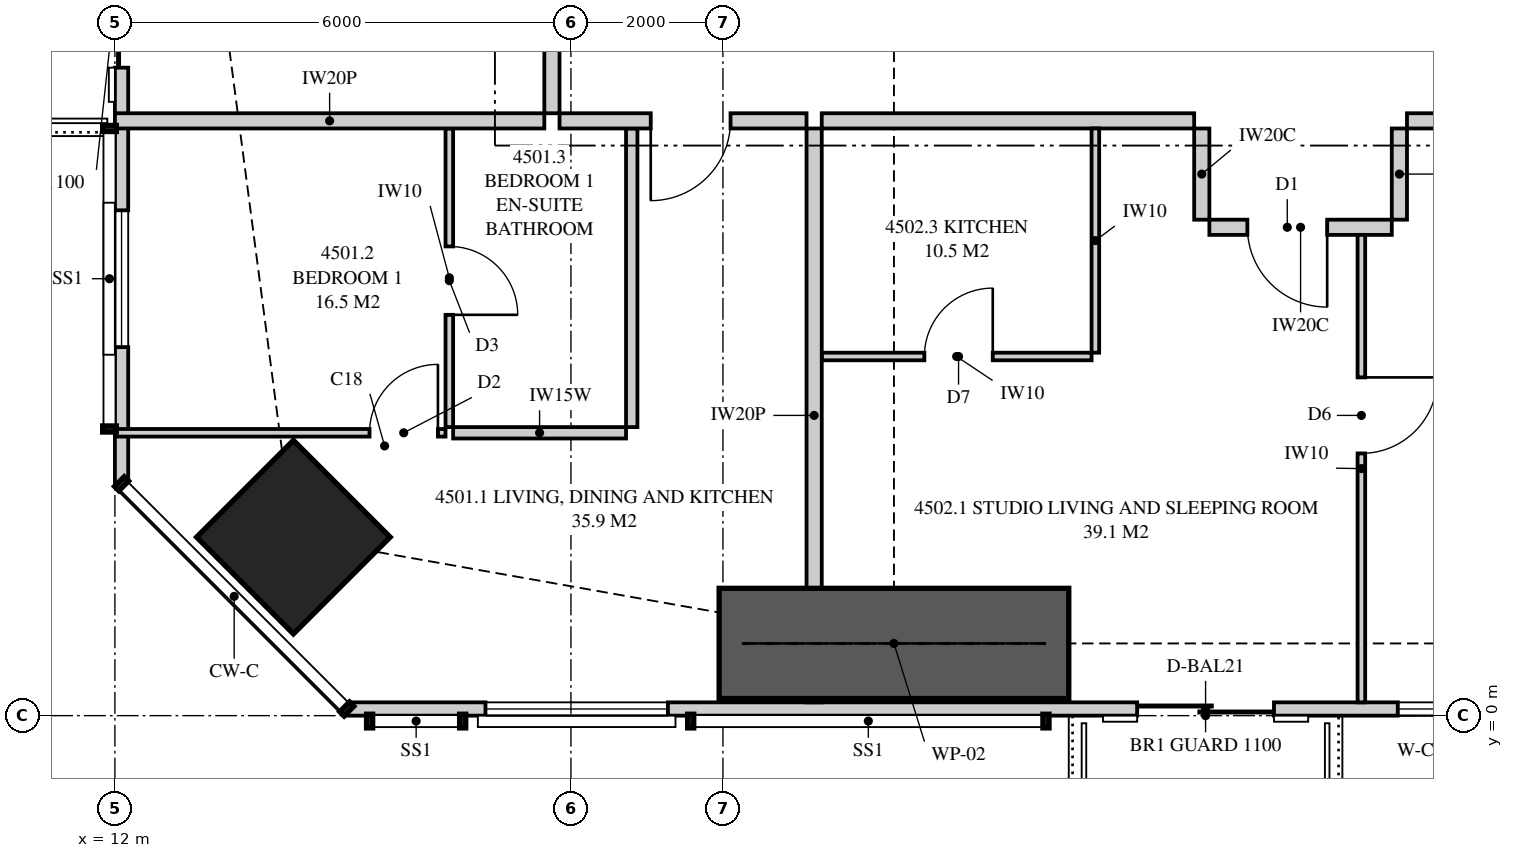
"""IFC4 building model, lengths in metres.
Left out: names, types, materials, properties, quantities, classifications, styles, units other than length and angle.
Written with IfcOpenShell. Run it as: python <this file> out.ifc"""

import sys

from ifc_helpers import new_model, si_unit, direction, frame, frame_2d, origin, origin_2d, place, context, subcontext, project, spatial, polyline, rectangle, outline, extrude, element, fill, save


model = new_model("IFC4")
c1 = context("Model", 3, precision=1e-05, world=origin(), true_north=direction((0.0, 1.0)))
c2 = subcontext(c1, "Body", "Model", "MODEL_VIEW")
j1 = project(units=[si_unit("LENGTHUNIT", "METRE"), si_unit("PLANEANGLEUNIT", "RADIAN")], contexts=[c1])
p1 = place(None, origin())
s1 = spatial("IfcSite", under=j1, at=p1, CompositionType="ELEMENT")
p2 = place(p1, origin())
s2 = spatial("IfcBuilding", under=s1, at=p2, CompositionType="ELEMENT")
p3 = place(p2, frame((0.0, 0.0, 167.75)))
s3 = spatial("IfcBuildingStorey", under=s2, at=p3, CompositionType="ELEMENT", Elevation=167.75)
p4 = place(p3, frame((14.348, 2.348, 0.0), z_axis=(0.0, 0.0, 1.0), x_axis=(0.707106781187, 0.707106781187, 0.0)))
e1 = element("IfcColumn", 1, at=p4, inside=s3, PredefinedType="COLUMN", context=c2, shape_type="SweptSolid", body=[
    extrude(rectangle(XDim=1.8, YDim=1.8, at=origin_2d()), origin(), (0.0, 0.0, 1.0), 3.35),
])
p5 = place(p3, frame((15.051, 0.087, 0.0), z_axis=(0.0, 0.0, 1.0), x_axis=(1.0, 0.0, 0.0)))
e2 = element("IfcWall", 2, at=p5, inside=s3, PredefinedType="SOLIDWALL", context=c2, shape_type="SweptSolid", body=[
    extrude(outline(polyline([(0.0, 0.0), (34.897, 0.0), (34.897, 3.11), (27.91, 3.11), (27.91, 2.15), (27.836, 2.15), (27.836, 3.11), (27.699, 3.11), (27.699, 2.15), (7.199, 2.15), (7.199, 3.11), (7.062, 3.11), (7.062, 2.15), (6.987, 2.15), (6.987, 3.11), (0.0, 3.11), (0.0, 0.0)])), frame((0.0, 0.087, 0.0), z_axis=(0.0, -1.0, 0.0), x_axis=(1.0, 0.0, 0.0)), (0.0, 0.0, 1.0), 0.175),
])
p6 = place(p5, frame((1.824, 0.0, 0.4)))
e3 = element("IfcOpeningElement", 3, at=p6, cuts=e2, PredefinedType="OPENING", context=c2, shape_type="SweptSolid", body=[
    extrude(rectangle(XDim=2.4, YDim=1.7, at=frame_2d((1.2, 0.85))), frame((0.0, 0.097, 0.0), z_axis=(0.0, -1.0, 0.0), x_axis=(1.0, 0.0, 0.0)), (0.0, 0.0, 1.0), 0.195),
])
p7 = place(p5, frame((10.399, 0.0, 0.0)))
e4 = element("IfcOpeningElement", 4, at=p7, cuts=e2, PredefinedType="OPENING", context=c2, shape_type="SweptSolid", body=[
    extrude(rectangle(XDim=1.8, YDim=2.1, at=frame_2d((0.9, 1.05))), frame((0.0, 0.097, 0.0), z_axis=(0.0, -1.0, 0.0), x_axis=(1.0, 0.0, 0.0)), (0.0, 0.0, 1.0), 0.195),
])
p8 = place(p5, frame((13.827, 0.0, 0.4)))
e5 = element("IfcOpeningElement", 5, at=p8, cuts=e2, PredefinedType="OPENING", context=c2, shape_type="SweptSolid", body=[
    extrude(rectangle(XDim=1.2, YDim=1.7, at=frame_2d((0.6, 0.85))), frame((0.0, 0.097, 0.0), z_axis=(0.0, -1.0, 0.0), x_axis=(1.0, 0.0, 0.0)), (0.0, 0.0, 1.0), 0.195),
])
p9 = place(p5, frame((22.799, 0.0, 0.0)))
e6 = element("IfcOpeningElement", 6, at=p9, cuts=e2, PredefinedType="OPENING", context=c2, shape_type="SweptSolid", body=[
    extrude(rectangle(XDim=1.8, YDim=2.1, at=frame_2d((0.9, 1.05))), frame((0.0, 0.097, 0.0), z_axis=(0.0, -1.0, 0.0), x_axis=(1.0, 0.0, 0.0)), (0.0, 0.0, 1.0), 0.195),
])
p10 = place(p5, frame((19.849, 0.0, 0.4)))
e7 = element("IfcOpeningElement", 7, at=p10, cuts=e2, PredefinedType="OPENING", context=c2, shape_type="SweptSolid", body=[
    extrude(rectangle(XDim=2.4, YDim=1.7, at=frame_2d((1.2, 0.85))), frame((0.0, 0.097, 0.0), z_axis=(0.0, -1.0, 0.0), x_axis=(1.0, 0.0, 0.0)), (0.0, 0.0, 1.0), 0.195),
])
p11 = place(p5, frame((30.108, 0.0, 0.4)))
e8 = element("IfcOpeningElement", 8, at=p11, cuts=e2, PredefinedType="OPENING", context=c2, shape_type="SweptSolid", body=[
    extrude(rectangle(XDim=2.4, YDim=1.7, at=frame_2d((1.2, 0.85))), frame((0.0, 0.097, 0.0), z_axis=(0.0, -1.0, 0.0), x_axis=(1.0, 0.0, 0.0)), (0.0, 0.0, 1.0), 0.195),
])
p12 = place(p3, frame((12.087, 32.949, 0.0), z_axis=(0.0, 0.0, 1.0), x_axis=(0.0, -1.0, 0.0)))
e9 = element("IfcWall", 9, at=p12, inside=s3, PredefinedType="SOLIDWALL", context=c2, shape_type="SweptSolid", body=[
    extrude(outline(polyline([(0.0, 0.0), (29.897, 0.0), (29.897, 3.11), (20.191, 3.11), (20.191, 2.15), (20.051, 2.15), (20.051, 3.11), (19.949, 3.11), (19.949, 2.15), (7.949, 2.15), (7.949, 3.11), (7.823, 3.11), (7.823, 2.15), (7.73, 2.15), (7.73, 3.11), (0.0, 3.11), (0.0, 0.0)])), frame((0.0, 0.087, 0.0), z_axis=(0.0, -1.0, 0.0), x_axis=(1.0, 0.0, 0.0)), (0.0, 0.0, 1.0), 0.175),
])
p13 = place(p12, frame((1.297, 0.0, 0.4)))
e10 = element("IfcOpeningElement", 10, at=p13, cuts=e9, PredefinedType="OPENING", context=c2, shape_type="SweptSolid", body=[
    extrude(rectangle(XDim=1.8, YDim=1.7, at=frame_2d((0.9, 0.85))), frame((0.0, 0.097, 0.0), z_axis=(0.0, -1.0, 0.0), x_axis=(1.0, 0.0, 0.0)), (0.0, 0.0, 1.0), 0.195),
])
p14 = place(p12, frame((4.349, 0.0, 0.4)))
e11 = element("IfcOpeningElement", 11, at=p14, cuts=e9, PredefinedType="OPENING", context=c2, shape_type="SweptSolid", body=[
    extrude(rectangle(XDim=1.2, YDim=1.7, at=frame_2d((0.6, 0.85))), frame((0.0, 0.097, 0.0), z_axis=(0.0, -1.0, 0.0), x_axis=(1.0, 0.0, 0.0)), (0.0, 0.0, 1.0), 0.195),
])
p15 = place(p12, frame((11.024, 0.0, 0.4)))
e12 = element("IfcOpeningElement", 12, at=p15, cuts=e9, PredefinedType="OPENING", context=c2, shape_type="SweptSolid", body=[
    extrude(rectangle(XDim=1.8, YDim=1.7, at=frame_2d((0.9, 0.85))), frame((0.0, 0.097, 0.0), z_axis=(0.0, -1.0, 0.0), x_axis=(1.0, 0.0, 0.0)), (0.0, 0.0, 1.0), 0.195),
])
p16 = place(p12, frame((15.044, 0.0, 0.4)))
e13 = element("IfcOpeningElement", 13, at=p16, cuts=e9, PredefinedType="OPENING", context=c2, shape_type="SweptSolid", body=[
    extrude(rectangle(XDim=2.4, YDim=1.7, at=frame_2d((1.2, 0.85))), frame((0.0, 0.097, 0.0), z_axis=(0.0, -1.0, 0.0), x_axis=(1.0, 0.0, 0.0)), (0.0, 0.0, 1.0), 0.195),
])
p17 = place(p12, frame((22.624, 0.0, 0.0)))
e14 = element("IfcOpeningElement", 14, at=p17, cuts=e9, PredefinedType="OPENING", context=c2, shape_type="SweptSolid", body=[
    extrude(rectangle(XDim=1.8, YDim=2.1, at=frame_2d((0.9, 1.05))), frame((0.0, 0.097, 0.0), z_axis=(0.0, -1.0, 0.0), x_axis=(1.0, 0.0, 0.0)), (0.0, 0.0, 1.0), 0.195),
])
p18 = place(p12, frame((26.301, 0.0, 0.4)))
e15 = element("IfcOpeningElement", 15, at=p18, cuts=e9, PredefinedType="OPENING", context=c2, shape_type="SweptSolid", body=[
    extrude(rectangle(XDim=1.8, YDim=1.7, at=frame_2d((0.9, 0.85))), frame((0.0, 0.097, 0.0), z_axis=(0.0, -1.0, 0.0), x_axis=(1.0, 0.0, 0.0)), (0.0, 0.0, 1.0), 0.195),
])
p19 = place(p3, frame((21.2, 0.175, 0.0), z_axis=(0.0, 0.0, 1.0), x_axis=(0.0, 1.0, 0.0)))
e16 = element("IfcWall", 16, at=p19, inside=s3, PredefinedType="PARTITIONING", context=c2, shape_type="SweptSolid", body=[
    extrude(outline(polyline([(0.037, 3.11), (0.0, 3.11), (0.0, 0.0), (0.529, 0.0), (0.529, 0.667), (1.021, 0.667), (1.021, 0.0), (7.55, 0.0), (7.55, 3.11), (1.885, 3.11), (1.885, 2.15), (1.021, 2.15), (1.021, 1.483), (0.529, 1.483), (0.529, 2.15), (0.037, 2.15), (0.037, 3.11)])), frame((0.0, 0.1, 0.0), z_axis=(0.0, -1.0, 0.0), x_axis=(1.0, 0.0, 0.0)), (0.0, 0.0, 1.0), 0.2),
])
p20 = place(p3, frame((17.85, 7.825, 0.0), z_axis=(0.0, 0.0, 1.0), x_axis=(1.0, 0.0, 0.0)))
e17 = element("IfcWall", 17, at=p20, inside=s3, PredefinedType="PARTITIONING", context=c2, shape_type="SweptSolid", body=[
    extrude(rectangle(XDim=3.25, YDim=0.2, at=frame_2d((1.625, 0.0))), origin(), (0.0, 0.0, 1.0), 3.11),
])
p21 = place(p20, frame((1.2, 0.0, 0.0)))
e18 = element("IfcOpeningElement", 18, at=p21, cuts=e17, PredefinedType="OPENING", context=c2, shape_type="SweptSolid", body=[
    extrude(rectangle(XDim=1.05, YDim=2.2, at=frame_2d((0.525, 1.1))), frame((0.0, 0.11, 0.0), z_axis=(0.0, -1.0, 0.0), x_axis=(1.0, 0.0, 0.0)), (0.0, 0.0, 1.0), 0.22),
])
p22 = place(p3, frame((16.4, 3.796, 0.0), z_axis=(0.0, 0.0, 1.0), x_axis=(0.0, 1.0, 0.0)))
e19 = element("IfcWall", 19, at=p22, inside=s3, PredefinedType="PARTITIONING", context=c2, shape_type="SweptSolid", body=[
    extrude(rectangle(XDim=3.929, YDim=0.1, at=frame_2d((1.964, 0.0))), origin(), (0.0, 0.0, 1.0), 3.11),
])
p23 = place(p22, frame((1.477, 0.0, 0.0)))
e20 = element("IfcOpeningElement", 20, at=p23, cuts=e19, PredefinedType="OPENING", context=c2, shape_type="SweptSolid", body=[
    extrude(rectangle(XDim=0.9, YDim=2.1, at=frame_2d((0.45, 1.05))), frame((0.0, 0.06, 0.0), z_axis=(0.0, -1.0, 0.0), x_axis=(1.0, 0.0, 0.0)), (0.0, 0.0, 1.0), 0.12),
])
p24 = place(p3, frame((16.35, 3.721, 0.0), z_axis=(0.0, 0.0, 1.0), x_axis=(-1.0, 0.0, 0.0)))
e21 = element("IfcWall", 21, at=p24, inside=s3, PredefinedType="PARTITIONING", context=c2, shape_type="SweptSolid", body=[
    extrude(outline(polyline([(0.0, 0.0), (4.35, 0.0), (4.35, 3.11), (3.049, 3.11), (3.049, 2.15), (1.314, 2.15), (1.314, 3.11), (0.0, 3.11), (0.0, 0.0)])), frame((0.0, 0.05, 0.0), z_axis=(0.0, -1.0, 0.0), x_axis=(1.0, 0.0, 0.0)), (0.0, 0.0, 1.0), 0.1),
])
p25 = place(p24, frame((0.1, 0.0, 0.0)))
e22 = element("IfcOpeningElement", 22, at=p25, cuts=e21, PredefinedType="OPENING", context=c2, shape_type="SweptSolid", body=[
    extrude(rectangle(XDim=0.9, YDim=2.1, at=frame_2d((0.45, 1.05))), frame((0.0, 0.06, 0.0), z_axis=(0.0, -1.0, 0.0), x_axis=(1.0, 0.0, 0.0)), (0.0, 0.0, 1.0), 0.12),
])
p26 = place(p3, frame((18.725, 3.721, 0.0), z_axis=(0.0, 0.0, 1.0), x_axis=(-1.0, 0.0, 0.0)))
e23 = element("IfcWall", 23, at=p26, inside=s3, PredefinedType="PLUMBINGWALL", context=c2, shape_type="SweptSolid", body=[
    extrude(rectangle(XDim=2.275, YDim=0.15, at=frame_2d((1.138, 0.0))), origin(), (0.0, 0.0, 1.0), 3.11),
])
p27 = place(p3, frame((18.8, 3.796, 0.0), z_axis=(0.0, 0.0, 1.0), x_axis=(0.0, 1.0, 0.0)))
e24 = element("IfcWall", 24, at=p27, inside=s3, PredefinedType="PLUMBINGWALL", context=c2, shape_type="SweptSolid", body=[
    extrude(rectangle(XDim=3.929, YDim=0.15, at=frame_2d((1.964, 0.0))), origin(), (0.0, 0.0, 1.0), 3.11),
])
p28 = place(p3, frame((21.3, 7.825, 0.0), z_axis=(0.0, 0.0, 1.0), x_axis=(1.0, 0.0, 0.0)))
e25 = element("IfcWall", 25, at=p28, inside=s3, PredefinedType="PARTITIONING", context=c2, shape_type="SweptSolid", body=[
    extrude(outline(polyline([(0.0, 0.0), (4.9, 0.0), (4.9, 3.11), (1.287, 3.11), (1.287, 2.541), (0.613, 2.541), (0.613, 3.11), (0.0, 3.11), (0.0, 0.0)])), frame((0.0, 0.1, 0.0), z_axis=(0.0, -1.0, 0.0), x_axis=(1.0, 0.0, 0.0)), (0.0, 0.0, 1.0), 0.2),
])
p29 = place(p3, frame((21.3, 4.725, 0.0), z_axis=(0.0, 0.0, 1.0), x_axis=(1.0, 0.0, 0.0)))
e26 = element("IfcWall", 26, at=p29, inside=s3, PredefinedType="PARTITIONING", context=c2, shape_type="SweptSolid", body=[
    extrude(outline(polyline([(0.0, 0.0), (3.55, 0.0), (3.55, 3.11), (1.237, 3.11), (1.237, 2.541), (0.663, 2.541), (0.663, 3.11), (0.0, 3.11), (0.0, 0.0)])), frame((0.0, 0.05, 0.0), z_axis=(0.0, -1.0, 0.0), x_axis=(1.0, 0.0, 0.0)), (0.0, 0.0, 1.0), 0.1),
])
p30 = place(p29, frame((1.35, 0.0, 0.0)))
e27 = element("IfcOpeningElement", 27, at=p30, cuts=e26, PredefinedType="OPENING", context=c2, shape_type="SweptSolid", body=[
    extrude(rectangle(XDim=0.9, YDim=2.1, at=frame_2d((0.45, 1.05))), frame((0.0, 0.06, 0.0), z_axis=(0.0, -1.0, 0.0), x_axis=(1.0, 0.0, 0.0)), (0.0, 0.0, 1.0), 0.12),
])
p31 = place(p3, frame((24.9, 4.775, 0.0), z_axis=(0.0, 0.0, 1.0), x_axis=(0.0, 1.0, 0.0)))
e28 = element("IfcWall", 28, at=p31, inside=s3, PredefinedType="PARTITIONING", context=c2, shape_type="SweptSolid", body=[
    extrude(rectangle(XDim=2.95, YDim=0.1, at=frame_2d((1.475, 0.0))), origin(), (0.0, 0.0, 1.0), 3.11),
])
p32 = place(p3, frame((28.4, 0.175, 0.0), z_axis=(0.0, 0.0, 1.0), x_axis=(0.0, 1.0, 0.0)))
e29 = element("IfcWall", 29, at=p32, inside=s3, PredefinedType="PARTITIONING", context=c2, shape_type="SweptSolid", body=[
    extrude(outline(polyline([(0.0, 0.0), (6.15, 0.0), (6.15, 3.11), (1.635, 3.11), (1.635, 2.15), (0.0, 2.15), (0.0, 3.11), (0.0, 0.0)])), frame((0.0, 0.05, 0.0), z_axis=(0.0, -1.0, 0.0), x_axis=(1.0, 0.0, 0.0)), (0.0, 0.0, 1.0), 0.1),
])
p33 = place(p32, frame((3.275, 0.0, 0.0)))
e30 = element("IfcOpeningElement", 30, at=p33, cuts=e29, PredefinedType="OPENING", context=c2, shape_type="SweptSolid", body=[
    extrude(rectangle(XDim=1.0, YDim=2.1, at=frame_2d((0.5, 1.05))), frame((0.0, 0.06, 0.0), z_axis=(0.0, -1.0, 0.0), x_axis=(1.0, 0.0, 0.0)), (0.0, 0.0, 1.0), 0.12),
])
p34 = place(p3, frame((12.0, 7.825, 0.0), z_axis=(0.0, 0.0, 1.0), x_axis=(1.0, 0.0, 0.0)))
e31 = element("IfcWall", 31, at=p34, inside=s3, PredefinedType="PARTITIONING", context=c2, shape_type="SweptSolid", body=[
    extrude(outline(polyline([(0.0, 0.0), (5.65, 0.0), (5.65, 3.11), (2.547, 3.11), (2.547, 2.15), (0.712, 2.15), (0.712, 3.11), (0.0, 3.11), (0.0, 0.0)])), frame((0.0, 0.1, 0.0), z_axis=(0.0, -1.0, 0.0), x_axis=(1.0, 0.0, 0.0)), (0.0, 0.0, 1.0), 0.2),
])
p35 = place(p3, frame((17.75, 7.925, 0.0), z_axis=(0.0, 0.0, 1.0), x_axis=(0.0, 1.0, 0.0)))
e32 = element("IfcWall", 32, at=p35, inside=s3, PredefinedType="PARTITIONING", context=c2, shape_type="SweptSolid", body=[
    extrude(outline(polyline([(0.0, 0.0), (14.875, 0.0), (14.875, 3.11), (5.412, 3.11), (5.412, 2.541), (4.738, 2.541), (4.738, 3.11), (0.0, 3.11), (0.0, 0.0)])), frame((0.0, 0.1, 0.0), z_axis=(0.0, -1.0, 0.0), x_axis=(1.0, 0.0, 0.0)), (0.0, 0.0, 1.0), 0.2),
])
p36 = place(p35, frame((6.938, 0.0, 0.0)))
e33 = element("IfcOpeningElement", 33, at=p36, cuts=e32, PredefinedType="OPENING", context=c2, shape_type="SweptSolid", body=[
    extrude(rectangle(XDim=1.05, YDim=2.2, at=frame_2d((0.525, 1.1))), frame((0.0, 0.11, 0.0), z_axis=(0.0, -1.0, 0.0), x_axis=(1.0, 0.0, 0.0)), (0.0, 0.0, 1.0), 0.22),
])
p37 = place(p3, frame((29.0, 7.825, 0.0), z_axis=(0.0, 0.0, 1.0), x_axis=(1.0, 0.0, 0.0)))
e34 = element("IfcWall", 34, at=p37, inside=s3, PredefinedType="PARTITIONING", context=c2, shape_type="SweptSolid", body=[
    extrude(outline(polyline([(0.0, 0.0), (4.5, 0.0), (4.5, 3.11), (3.837, 3.11), (3.837, 2.541), (3.163, 2.541), (3.163, 3.11), (0.0, 3.11), (0.0, 0.0)])), frame((0.0, 0.1, 0.0), z_axis=(0.0, -1.0, 0.0), x_axis=(1.0, 0.0, 0.0)), (0.0, 0.0, 1.0), 0.2),
])
p38 = place(p3, frame((26.4, 6.425, 0.0), z_axis=(0.0, 0.0, 1.0), x_axis=(1.0, 0.0, 0.0)))
e35 = element("IfcWall", 35, at=p38, inside=s3, PredefinedType="PARTITIONING", context=c2, shape_type="SweptSolid", body=[
    extrude(rectangle(XDim=2.4, YDim=0.2, at=frame_2d((1.2, 0.0))), origin(), (0.0, 0.0, 1.0), 3.11),
])
p39 = place(p38, frame((0.5, 0.0, 0.0)))
e36 = element("IfcOpeningElement", 36, at=p39, cuts=e35, PredefinedType="OPENING", context=c2, shape_type="SweptSolid", body=[
    extrude(rectangle(XDim=1.05, YDim=2.2, at=frame_2d((0.525, 1.1))), frame((0.0, 0.11, 0.0), z_axis=(0.0, -1.0, 0.0), x_axis=(1.0, 0.0, 0.0)), (0.0, 0.0, 1.0), 0.22),
])
for number, where, z_axis, x_axis in (
    (37, (26.3, 7.725, 0.0), (0.0, 0.0, 1.0), (0.0, -1.0, 0.0)),
    (38, (28.9, 7.725, 0.0), (0.0, 0.0, 1.0), (0.0, -1.0, 0.0)),
):
    element("IfcWall", number, at=place(p3, frame(where, z_axis=z_axis, x_axis=x_axis)), inside=s3, PredefinedType="PARTITIONING", context=c2, shape_type="SweptSolid", body=[
        extrude(rectangle(XDim=1.2, YDim=0.2, at=frame_2d((0.6, 0.0))), origin(), (0.0, 0.0, 1.0), 3.11),
    ])
p40 = place(p3, frame((19.95, 0.95, 0.0), z_axis=(0.0, 0.0, 1.0), x_axis=(1.0, 0.0, 0.0)))
e39 = element("IfcWall", 39, at=p40, inside=s3, PredefinedType="SHEAR", context=c2, shape_type="SweptSolid", body=[
    extrude(rectangle(XDim=4.6, YDim=1.45, at=frame_2d((2.3, 0.0))), origin(), (0.0, 0.0, 1.0), 3.35),
])
p41 = place(p6, origin())
e40 = element("IfcWindow", 40, at=p41, inside=s3, PartitioningType="SINGLE_PANEL", PredefinedType="WINDOW", context=c2, shape_type="SweptSolid", body=[
    extrude(rectangle(XDim=2.4, YDim=1.7, at=frame_2d((1.2, 0.85))), frame((0.0, 0.03, 0.0), z_axis=(0.0, -1.0, 0.0), x_axis=(1.0, 0.0, 0.0)), (0.0, 0.0, 1.0), 0.06),
])
fill(e3, e40)
p42 = place(p7, origin())
e41 = element("IfcDoor", 41, at=p42, inside=s3, OperationType="SLIDING_TO_LEFT", PredefinedType="DOOR", context=c2, shape_type="SweptSolid", body=[
    extrude(rectangle(XDim=1.8, YDim=2.1, at=frame_2d((0.9, 1.05))), frame((0.0, 0.025, 0.0), z_axis=(0.0, -1.0, 0.0), x_axis=(1.0, 0.0, 0.0)), (0.0, 0.0, 1.0), 0.05),
])
fill(e4, e41)
p43 = place(p8, origin())
e42 = element("IfcWindow", 42, at=p43, inside=s3, PartitioningType="SINGLE_PANEL", PredefinedType="WINDOW", context=c2, shape_type="SweptSolid", body=[
    extrude(rectangle(XDim=1.2, YDim=1.7, at=frame_2d((0.6, 0.85))), frame((0.0, 0.03, 0.0), z_axis=(0.0, -1.0, 0.0), x_axis=(1.0, 0.0, 0.0)), (0.0, 0.0, 1.0), 0.06),
])
fill(e5, e42)
p44 = place(p17, origin())
e43 = element("IfcDoor", 43, at=p44, inside=s3, OperationType="SLIDING_TO_LEFT", PredefinedType="DOOR", context=c2, shape_type="SweptSolid", body=[
    extrude(rectangle(XDim=1.8, YDim=2.1, at=frame_2d((0.9, 1.05))), frame((0.0, 0.025, 0.0), z_axis=(0.0, -1.0, 0.0), x_axis=(1.0, 0.0, 0.0)), (0.0, 0.0, 1.0), 0.05),
])
fill(e14, e43)
p45 = place(p18, origin())
e44 = element("IfcWindow", 44, at=p45, inside=s3, PartitioningType="SINGLE_PANEL", PredefinedType="WINDOW", context=c2, shape_type="SweptSolid", body=[
    extrude(rectangle(XDim=1.8, YDim=1.7, at=frame_2d((0.9, 0.85))), frame((0.0, 0.03, 0.0), z_axis=(0.0, -1.0, 0.0), x_axis=(1.0, 0.0, 0.0)), (0.0, 0.0, 1.0), 0.06),
])
fill(e15, e44)
p46 = place(p21, frame((1.05, 0.0, 0.0), z_axis=(0.0, 0.0, 1.0), x_axis=(-1.0, 0.0, 0.0)))
e45 = element("IfcDoor", 45, at=p46, inside=s3, OperationType="SINGLE_SWING_RIGHT", PredefinedType="DOOR", context=c2, shape_type="SweptSolid", body=[
    extrude(rectangle(XDim=1.05, YDim=2.2, at=frame_2d((0.525, 1.1))), frame((0.0, 0.025, 0.0), z_axis=(0.0, -1.0, 0.0), x_axis=(1.0, 0.0, 0.0)), (0.0, 0.0, 1.0), 0.05),
])
fill(e18, e45)
p47 = place(p25, frame((0.9, 0.0, 0.0), z_axis=(0.0, 0.0, 1.0), x_axis=(-1.0, 0.0, 0.0)))
e46 = element("IfcDoor", 46, at=p47, inside=s3, OperationType="SINGLE_SWING_RIGHT", PredefinedType="DOOR", context=c2, shape_type="SweptSolid", body=[
    extrude(rectangle(XDim=0.9, YDim=2.1, at=frame_2d((0.45, 1.05))), frame((0.0, 0.025, 0.0), z_axis=(0.0, -1.0, 0.0), x_axis=(1.0, 0.0, 0.0)), (0.0, 0.0, 1.0), 0.05),
])
fill(e22, e46)
p48 = place(p23, frame((0.9, 0.0, 0.0), z_axis=(0.0, 0.0, 1.0), x_axis=(-1.0, 0.0, 0.0)))
e47 = element("IfcDoor", 47, at=p48, inside=s3, OperationType="SINGLE_SWING_RIGHT", PredefinedType="DOOR", context=c2, shape_type="SweptSolid", body=[
    extrude(rectangle(XDim=0.9, YDim=2.1, at=frame_2d((0.45, 1.05))), frame((0.0, 0.025, 0.0), z_axis=(0.0, -1.0, 0.0), x_axis=(1.0, 0.0, 0.0)), (0.0, 0.0, 1.0), 0.05),
])
fill(e20, e47)
p49 = place(p39, frame((1.05, 0.0, 0.0), z_axis=(0.0, 0.0, 1.0), x_axis=(-1.0, 0.0, 0.0)))
e48 = element("IfcDoor", 48, at=p49, inside=s3, OperationType="SINGLE_SWING_LEFT", PredefinedType="DOOR", context=c2, shape_type="SweptSolid", body=[
    extrude(rectangle(XDim=1.05, YDim=2.2, at=frame_2d((0.525, 1.1))), frame((0.0, 0.025, 0.0), z_axis=(0.0, -1.0, 0.0), x_axis=(1.0, 0.0, 0.0)), (0.0, 0.0, 1.0), 0.05),
])
fill(e36, e48)
p50 = place(p30, origin())
e49 = element("IfcDoor", 49, at=p50, inside=s3, OperationType="SINGLE_SWING_RIGHT", PredefinedType="DOOR", context=c2, shape_type="SweptSolid", body=[
    extrude(rectangle(XDim=0.9, YDim=2.1, at=frame_2d((0.45, 1.05))), frame((0.0, 0.025, 0.0), z_axis=(0.0, -1.0, 0.0), x_axis=(1.0, 0.0, 0.0)), (0.0, 0.0, 1.0), 0.05),
])
fill(e27, e49)
p51 = place(p33, frame((1.0, 0.0, 0.0), z_axis=(0.0, 0.0, 1.0), x_axis=(-1.0, 0.0, 0.0)))
e50 = element("IfcDoor", 50, at=p51, inside=s3, OperationType="SINGLE_SWING_LEFT", PredefinedType="DOOR", context=c2, shape_type="SweptSolid", body=[
    extrude(rectangle(XDim=1.0, YDim=2.1, at=frame_2d((0.5, 1.05))), frame((0.0, 0.025, 0.0), z_axis=(0.0, -1.0, 0.0), x_axis=(1.0, 0.0, 0.0)), (0.0, 0.0, 1.0), 0.05),
])
fill(e30, e50)
save(model, sys.argv[1])
